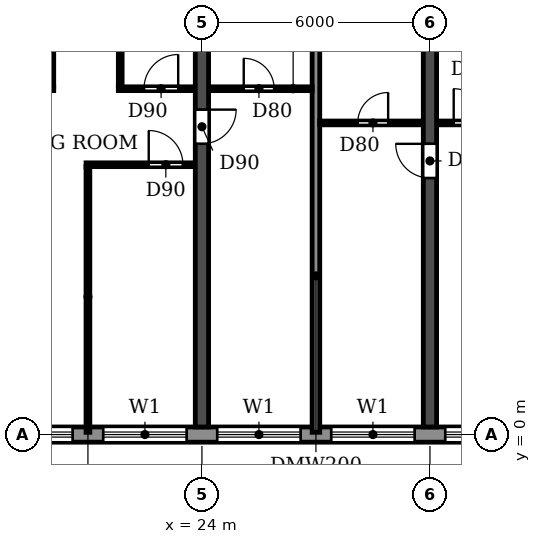
"""IFC4 building model, lengths in metres.
Left out: names, types, materials, properties, quantities, classifications, styles, units other than length and angle.
Written with IfcOpenShell. Run it as: python <this file> out.ifc"""

import sys

from ifc_helpers import new_model, si_unit, direction, frame, frame_2d, origin, place, context, subcontext, project, spatial, rectangle, extrude, element, fill, save


model = new_model("IFC4")
c1 = context("Model", 3, precision=1e-05, world=origin(), true_north=direction((0.0, 1.0)))
c2 = subcontext(c1, "Body", "Model", "MODEL_VIEW")
j1 = project(units=[si_unit("LENGTHUNIT", "METRE"), si_unit("PLANEANGLEUNIT", "RADIAN")], contexts=[c1])
p1 = place(None, origin())
s1 = spatial("IfcSite", under=j1, at=p1, CompositionType="ELEMENT")
p2 = place(p1, origin())
s2 = spatial("IfcBuilding", under=s1, at=p2, CompositionType="ELEMENT")
p3 = place(p2, frame((0.0, 0.0, 92.7)))
s3 = spatial("IfcBuildingStorey", under=s2, at=p3, CompositionType="ELEMENT", Elevation=92.7)
p4 = place(p3, frame((24.0, 0.2, 0.0), z_axis=(0.0, 0.0, 1.0), x_axis=(0.0, 1.0, 0.0)))
e1 = element("IfcWall", 1, at=p4, inside=s3, PredefinedType="SHEAR", context=c2, shape_type="SweptSolid", body=[
    extrude(rectangle(XDim=11.675, YDim=0.35, at=frame_2d((5.837, 0.0))), origin(), (0.0, 0.0, 1.0), 3.06),
])
p5 = place(p4, frame((7.45, 0.0, 0.0)))
e2 = element("IfcOpeningElement", 2, at=p5, cuts=e1, PredefinedType="OPENING", context=c2, shape_type="SweptSolid", body=[
    extrude(rectangle(XDim=0.9, YDim=2.1, at=frame_2d((0.45, 1.05))), frame((0.0, 0.185, 0.0), z_axis=(0.0, -1.0, 0.0), x_axis=(1.0, 0.0, 0.0)), (0.0, 0.0, 1.0), 0.37),
])
p6 = place(p3, frame((30.0, 0.2, 0.0), z_axis=(0.0, 0.0, 1.0), x_axis=(0.0, 1.0, 0.0)))
e3 = element("IfcWall", 3, at=p6, inside=s3, PredefinedType="SHEAR", context=c2, shape_type="SweptSolid", body=[
    extrude(rectangle(XDim=11.675, YDim=0.35, at=frame_2d((5.837, 0.0))), origin(), (0.0, 0.0, 1.0), 3.06),
])
p7 = place(p6, frame((6.55, 0.0, 0.0)))
e4 = element("IfcOpeningElement", 4, at=p7, cuts=e3, PredefinedType="OPENING", context=c2, shape_type="SweptSolid", body=[
    extrude(rectangle(XDim=0.9, YDim=2.1, at=frame_2d((0.45, 1.05))), frame((0.0, 0.185, 0.0), z_axis=(0.0, -1.0, 0.0), x_axis=(1.0, 0.0, 0.0)), (0.0, 0.0, 1.0), 0.37),
])
p8 = place(p3, frame((10.683, 0.0, 0.0), z_axis=(0.0, 0.0, 1.0), x_axis=(1.0, 0.0, 0.0)))
e5 = element("IfcWall", 5, at=p8, inside=s3, PredefinedType="STANDARD", context=c2, shape_type="SweptSolid", body=[
    extrude(rectangle(XDim=80.634, YDim=0.4, at=frame_2d((40.317, 0.0))), origin(), (0.0, 0.0, 1.0), 3.06),
])
p9 = place(p8, frame((1.717, 0.0, 0.9)))
e6 = element("IfcOpeningElement", 6, at=p9, cuts=e5, PredefinedType="OPENING", context=c2, shape_type="SweptSolid", body=[
    extrude(rectangle(XDim=2.2, YDim=1.5, at=frame_2d((1.1, 0.75))), frame((0.0, 0.21, 0.0), z_axis=(0.0, -1.0, 0.0), x_axis=(1.0, 0.0, 0.0)), (0.0, 0.0, 1.0), 0.42),
])
p10 = place(p8, frame((4.917, 0.0, 0.0)))
e7 = element("IfcOpeningElement", 7, at=p10, cuts=e5, PredefinedType="OPENING", context=c2, shape_type="SweptSolid", body=[
    extrude(rectangle(XDim=1.8, YDim=2.4, at=frame_2d((0.9, 1.2))), frame((0.0, 0.21, 0.0), z_axis=(0.0, -1.0, 0.0), x_axis=(1.0, 0.0, 0.0)), (0.0, 0.0, 1.0), 0.42),
])
p11 = place(p8, frame((7.717, 0.0, 0.9)))
e8 = element("IfcOpeningElement", 8, at=p11, cuts=e5, PredefinedType="OPENING", context=c2, shape_type="SweptSolid", body=[
    extrude(rectangle(XDim=2.2, YDim=1.5, at=frame_2d((1.1, 0.75))), frame((0.0, 0.21, 0.0), z_axis=(0.0, -1.0, 0.0), x_axis=(1.0, 0.0, 0.0)), (0.0, 0.0, 1.0), 0.42),
])
p12 = place(p8, frame((10.717, 0.0, 0.9)))
e9 = element("IfcOpeningElement", 9, at=p12, cuts=e5, PredefinedType="OPENING", context=c2, shape_type="SweptSolid", body=[
    extrude(rectangle(XDim=2.2, YDim=1.5, at=frame_2d((1.1, 0.75))), frame((0.0, 0.21, 0.0), z_axis=(0.0, -1.0, 0.0), x_axis=(1.0, 0.0, 0.0)), (0.0, 0.0, 1.0), 0.42),
])
p13 = place(p8, frame((13.717, 0.0, 0.9)))
e10 = element("IfcOpeningElement", 10, at=p13, cuts=e5, PredefinedType="OPENING", context=c2, shape_type="SweptSolid", body=[
    extrude(rectangle(XDim=2.2, YDim=1.5, at=frame_2d((1.1, 0.75))), frame((0.0, 0.21, 0.0), z_axis=(0.0, -1.0, 0.0), x_axis=(1.0, 0.0, 0.0)), (0.0, 0.0, 1.0), 0.42),
])
p14 = place(p8, frame((16.717, 0.0, 0.9)))
e11 = element("IfcOpeningElement", 11, at=p14, cuts=e5, PredefinedType="OPENING", context=c2, shape_type="SweptSolid", body=[
    extrude(rectangle(XDim=2.2, YDim=1.5, at=frame_2d((1.1, 0.75))), frame((0.0, 0.21, 0.0), z_axis=(0.0, -1.0, 0.0), x_axis=(1.0, 0.0, 0.0)), (0.0, 0.0, 1.0), 0.42),
])
p15 = place(p8, frame((19.717, 0.0, 0.9)))
e12 = element("IfcOpeningElement", 12, at=p15, cuts=e5, PredefinedType="OPENING", context=c2, shape_type="SweptSolid", body=[
    extrude(rectangle(XDim=2.2, YDim=1.5, at=frame_2d((1.1, 0.75))), frame((0.0, 0.21, 0.0), z_axis=(0.0, -1.0, 0.0), x_axis=(1.0, 0.0, 0.0)), (0.0, 0.0, 1.0), 0.42),
])
p16 = place(p8, frame((22.717, 0.0, 0.9)))
e13 = element("IfcOpeningElement", 13, at=p16, cuts=e5, PredefinedType="OPENING", context=c2, shape_type="SweptSolid", body=[
    extrude(rectangle(XDim=2.2, YDim=1.5, at=frame_2d((1.1, 0.75))), frame((0.0, 0.21, 0.0), z_axis=(0.0, -1.0, 0.0), x_axis=(1.0, 0.0, 0.0)), (0.0, 0.0, 1.0), 0.42),
])
p17 = place(p8, frame((25.717, 0.0, 0.9)))
e14 = element("IfcOpeningElement", 14, at=p17, cuts=e5, PredefinedType="OPENING", context=c2, shape_type="SweptSolid", body=[
    extrude(rectangle(XDim=2.2, YDim=1.5, at=frame_2d((1.1, 0.75))), frame((0.0, 0.21, 0.0), z_axis=(0.0, -1.0, 0.0), x_axis=(1.0, 0.0, 0.0)), (0.0, 0.0, 1.0), 0.42),
])
p18 = place(p8, frame((28.917, 0.0, 0.0)))
e15 = element("IfcOpeningElement", 15, at=p18, cuts=e5, PredefinedType="OPENING", context=c2, shape_type="SweptSolid", body=[
    extrude(rectangle(XDim=1.8, YDim=2.4, at=frame_2d((0.9, 1.2))), frame((0.0, 0.21, 0.0), z_axis=(0.0, -1.0, 0.0), x_axis=(1.0, 0.0, 0.0)), (0.0, 0.0, 1.0), 0.42),
])
p19 = place(p8, frame((31.717, 0.0, 0.9)))
e16 = element("IfcOpeningElement", 16, at=p19, cuts=e5, PredefinedType="OPENING", context=c2, shape_type="SweptSolid", body=[
    extrude(rectangle(XDim=2.2, YDim=1.5, at=frame_2d((1.1, 0.75))), frame((0.0, 0.21, 0.0), z_axis=(0.0, -1.0, 0.0), x_axis=(1.0, 0.0, 0.0)), (0.0, 0.0, 1.0), 0.42),
])
p20 = place(p8, frame((34.717, 0.0, 0.9)))
e17 = element("IfcOpeningElement", 17, at=p20, cuts=e5, PredefinedType="OPENING", context=c2, shape_type="SweptSolid", body=[
    extrude(rectangle(XDim=2.2, YDim=1.5, at=frame_2d((1.1, 0.75))), frame((0.0, 0.21, 0.0), z_axis=(0.0, -1.0, 0.0), x_axis=(1.0, 0.0, 0.0)), (0.0, 0.0, 1.0), 0.42),
])
p21 = place(p8, frame((37.917, 0.0, 0.0)))
e18 = element("IfcOpeningElement", 18, at=p21, cuts=e5, PredefinedType="OPENING", context=c2, shape_type="SweptSolid", body=[
    extrude(rectangle(XDim=1.8, YDim=2.4, at=frame_2d((0.9, 1.2))), frame((0.0, 0.21, 0.0), z_axis=(0.0, -1.0, 0.0), x_axis=(1.0, 0.0, 0.0)), (0.0, 0.0, 1.0), 0.42),
])
p22 = place(p8, frame((40.717, 0.0, 0.9)))
e19 = element("IfcOpeningElement", 19, at=p22, cuts=e5, PredefinedType="OPENING", context=c2, shape_type="SweptSolid", body=[
    extrude(rectangle(XDim=2.2, YDim=1.5, at=frame_2d((1.1, 0.75))), frame((0.0, 0.21, 0.0), z_axis=(0.0, -1.0, 0.0), x_axis=(1.0, 0.0, 0.0)), (0.0, 0.0, 1.0), 0.42),
])
p23 = place(p8, frame((43.717, 0.0, 0.9)))
e20 = element("IfcOpeningElement", 20, at=p23, cuts=e5, PredefinedType="OPENING", context=c2, shape_type="SweptSolid", body=[
    extrude(rectangle(XDim=2.2, YDim=1.5, at=frame_2d((1.1, 0.75))), frame((0.0, 0.21, 0.0), z_axis=(0.0, -1.0, 0.0), x_axis=(1.0, 0.0, 0.0)), (0.0, 0.0, 1.0), 0.42),
])
p24 = place(p8, frame((46.717, 0.0, 0.9)))
e21 = element("IfcOpeningElement", 21, at=p24, cuts=e5, PredefinedType="OPENING", context=c2, shape_type="SweptSolid", body=[
    extrude(rectangle(XDim=2.2, YDim=1.5, at=frame_2d((1.1, 0.75))), frame((0.0, 0.21, 0.0), z_axis=(0.0, -1.0, 0.0), x_axis=(1.0, 0.0, 0.0)), (0.0, 0.0, 1.0), 0.42),
])
p25 = place(p8, frame((49.717, 0.0, 0.9)))
e22 = element("IfcOpeningElement", 22, at=p25, cuts=e5, PredefinedType="OPENING", context=c2, shape_type="SweptSolid", body=[
    extrude(rectangle(XDim=2.2, YDim=1.5, at=frame_2d((1.1, 0.75))), frame((0.0, 0.21, 0.0), z_axis=(0.0, -1.0, 0.0), x_axis=(1.0, 0.0, 0.0)), (0.0, 0.0, 1.0), 0.42),
])
p26 = place(p8, frame((52.917, 0.0, 0.0)))
e23 = element("IfcOpeningElement", 23, at=p26, cuts=e5, PredefinedType="OPENING", context=c2, shape_type="SweptSolid", body=[
    extrude(rectangle(XDim=1.8, YDim=2.4, at=frame_2d((0.9, 1.2))), frame((0.0, 0.21, 0.0), z_axis=(0.0, -1.0, 0.0), x_axis=(1.0, 0.0, 0.0)), (0.0, 0.0, 1.0), 0.42),
])
p27 = place(p8, frame((55.717, 0.0, 0.9)))
e24 = element("IfcOpeningElement", 24, at=p27, cuts=e5, PredefinedType="OPENING", context=c2, shape_type="SweptSolid", body=[
    extrude(rectangle(XDim=2.2, YDim=1.5, at=frame_2d((1.1, 0.75))), frame((0.0, 0.21, 0.0), z_axis=(0.0, -1.0, 0.0), x_axis=(1.0, 0.0, 0.0)), (0.0, 0.0, 1.0), 0.42),
])
p28 = place(p8, frame((58.717, 0.0, 0.9)))
e25 = element("IfcOpeningElement", 25, at=p28, cuts=e5, PredefinedType="OPENING", context=c2, shape_type="SweptSolid", body=[
    extrude(rectangle(XDim=2.2, YDim=1.5, at=frame_2d((1.1, 0.75))), frame((0.0, 0.21, 0.0), z_axis=(0.0, -1.0, 0.0), x_axis=(1.0, 0.0, 0.0)), (0.0, 0.0, 1.0), 0.42),
])
p29 = place(p8, frame((61.717, 0.0, 0.9)))
e26 = element("IfcOpeningElement", 26, at=p29, cuts=e5, PredefinedType="OPENING", context=c2, shape_type="SweptSolid", body=[
    extrude(rectangle(XDim=2.2, YDim=1.5, at=frame_2d((1.1, 0.75))), frame((0.0, 0.21, 0.0), z_axis=(0.0, -1.0, 0.0), x_axis=(1.0, 0.0, 0.0)), (0.0, 0.0, 1.0), 0.42),
])
p30 = place(p8, frame((64.917, 0.0, 0.0)))
e27 = element("IfcOpeningElement", 27, at=p30, cuts=e5, PredefinedType="OPENING", context=c2, shape_type="SweptSolid", body=[
    extrude(rectangle(XDim=1.8, YDim=2.4, at=frame_2d((0.9, 1.2))), frame((0.0, 0.21, 0.0), z_axis=(0.0, -1.0, 0.0), x_axis=(1.0, 0.0, 0.0)), (0.0, 0.0, 1.0), 0.42),
])
p31 = place(p8, frame((67.717, 0.0, 0.9)))
e28 = element("IfcOpeningElement", 28, at=p31, cuts=e5, PredefinedType="OPENING", context=c2, shape_type="SweptSolid", body=[
    extrude(rectangle(XDim=2.2, YDim=1.5, at=frame_2d((1.1, 0.75))), frame((0.0, 0.21, 0.0), z_axis=(0.0, -1.0, 0.0), x_axis=(1.0, 0.0, 0.0)), (0.0, 0.0, 1.0), 0.42),
])
p32 = place(p8, frame((70.717, 0.0, 0.9)))
e29 = element("IfcOpeningElement", 29, at=p32, cuts=e5, PredefinedType="OPENING", context=c2, shape_type="SweptSolid", body=[
    extrude(rectangle(XDim=2.2, YDim=1.5, at=frame_2d((1.1, 0.75))), frame((0.0, 0.21, 0.0), z_axis=(0.0, -1.0, 0.0), x_axis=(1.0, 0.0, 0.0)), (0.0, 0.0, 1.0), 0.42),
])
p33 = place(p8, frame((73.917, 0.0, 0.0)))
e30 = element("IfcOpeningElement", 30, at=p33, cuts=e5, PredefinedType="OPENING", context=c2, shape_type="SweptSolid", body=[
    extrude(rectangle(XDim=1.8, YDim=2.4, at=frame_2d((0.9, 1.2))), frame((0.0, 0.21, 0.0), z_axis=(0.0, -1.0, 0.0), x_axis=(1.0, 0.0, 0.0)), (0.0, 0.0, 1.0), 0.42),
])
p34 = place(p8, frame((76.717, 0.0, 0.9)))
e31 = element("IfcOpeningElement", 31, at=p34, cuts=e5, PredefinedType="OPENING", context=c2, shape_type="SweptSolid", body=[
    extrude(rectangle(XDim=2.2, YDim=1.5, at=frame_2d((1.1, 0.75))), frame((0.0, 0.21, 0.0), z_axis=(0.0, -1.0, 0.0), x_axis=(1.0, 0.0, 0.0)), (0.0, 0.0, 1.0), 0.42),
])
p35 = place(p3, frame((27.0, 0.06, 0.0), z_axis=(0.0, 0.0, 1.0), x_axis=(0.0, 1.0, 0.0)))
e32 = element("IfcWall", 32, at=p35, inside=s3, PredefinedType="PARTITIONING", context=c2, shape_type="SweptSolid", body=[
    extrude(rectangle(XDim=11.805, YDim=0.2, at=frame_2d((5.902, 0.0))), origin(), (0.0, 0.0, 1.0), 3.06),
])
p36 = place(p3, frame((20.95, 7.1, 0.0), z_axis=(0.0, 0.0, 1.0), x_axis=(1.0, 0.0, 0.0)))
e33 = element("IfcWall", 33, at=p36, inside=s3, PredefinedType="PARTITIONING", context=c2, shape_type="SweptSolid", body=[
    extrude(rectangle(XDim=2.865, YDim=0.1, at=frame_2d((1.433, 0.0))), origin(), (0.0, 0.0, 1.0), 3.06),
])
p37 = place(p36, frame((1.65, 0.0, 0.0)))
e34 = element("IfcOpeningElement", 34, at=p37, cuts=e33, PredefinedType="OPENING", context=c2, shape_type="SweptSolid", body=[
    extrude(rectangle(XDim=0.9, YDim=2.1, at=frame_2d((0.45, 1.05))), frame((0.0, 0.06, 0.0), z_axis=(0.0, -1.0, 0.0), x_axis=(1.0, 0.0, 0.0)), (0.0, 0.0, 1.0), 0.12),
])
p38 = place(p3, frame((27.1, 8.2, 0.0), z_axis=(0.0, 0.0, 1.0), x_axis=(1.0, 0.0, 0.0)))
e35 = element("IfcWall", 35, at=p38, inside=s3, PredefinedType="PARTITIONING", context=c2, shape_type="SweptSolid", body=[
    extrude(rectangle(XDim=2.715, YDim=0.1, at=frame_2d((1.357, 0.0))), origin(), (0.0, 0.0, 1.0), 3.06),
])
p39 = place(p38, frame((1.0, 0.0, 0.0)))
e36 = element("IfcOpeningElement", 36, at=p39, cuts=e35, PredefinedType="OPENING", context=c2, shape_type="SweptSolid", body=[
    extrude(rectangle(XDim=0.8, YDim=2.1, at=frame_2d((0.4, 1.05))), frame((0.0, 0.06, 0.0), z_axis=(0.0, -1.0, 0.0), x_axis=(1.0, 0.0, 0.0)), (0.0, 0.0, 1.0), 0.12),
])
p40 = place(p3, frame((30.185, 8.2, 0.0), z_axis=(0.0, 0.0, 1.0), x_axis=(1.0, 0.0, 0.0)))
e37 = element("IfcWall", 37, at=p40, inside=s3, PredefinedType="PARTITIONING", context=c2, shape_type="SweptSolid", body=[
    extrude(rectangle(XDim=2.015, YDim=0.1, at=frame_2d((1.007, 0.0))), origin(), (0.0, 0.0, 1.0), 3.06),
])
p41 = place(p40, frame((0.44, 0.0, 0.0)))
e38 = element("IfcOpeningElement", 38, at=p41, cuts=e37, PredefinedType="OPENING", context=c2, shape_type="SweptSolid", body=[
    extrude(rectangle(XDim=0.9, YDim=2.1, at=frame_2d((0.45, 1.05))), frame((0.0, 0.06, 0.0), z_axis=(0.0, -1.0, 0.0), x_axis=(1.0, 0.0, 0.0)), (0.0, 0.0, 1.0), 0.12),
])
p42 = place(p3, frame((18.185, 9.1, 0.0), z_axis=(0.0, 0.0, 1.0), x_axis=(1.0, 0.0, 0.0)))
e39 = element("IfcWall", 39, at=p42, inside=s3, PredefinedType="PARTITIONING", context=c2, shape_type="SweptSolid", body=[
    extrude(rectangle(XDim=1.915, YDim=0.1, at=frame_2d((0.958, 0.0))), origin(), (0.0, 0.0, 1.0), 3.06),
])
p43 = place(p42, frame((0.44, 0.0, 0.0)))
e40 = element("IfcOpeningElement", 40, at=p43, cuts=e39, PredefinedType="OPENING", context=c2, shape_type="SweptSolid", body=[
    extrude(rectangle(XDim=0.8, YDim=2.1, at=frame_2d((0.4, 1.05))), frame((0.0, 0.06, 0.0), z_axis=(0.0, -1.0, 0.0), x_axis=(1.0, 0.0, 0.0)), (0.0, 0.0, 1.0), 0.12),
])
p44 = place(p3, frame((21.8, 9.1, 0.0), z_axis=(0.0, 0.0, 1.0), x_axis=(1.0, 0.0, 0.0)))
e41 = element("IfcWall", 41, at=p44, inside=s3, PredefinedType="PARTITIONING", context=c2, shape_type="SweptSolid", body=[
    extrude(rectangle(XDim=2.015, YDim=0.1, at=frame_2d((1.007, 0.0))), origin(), (0.0, 0.0, 1.0), 3.06),
])
p45 = place(p44, frame((0.675, 0.0, 0.0)))
e42 = element("IfcOpeningElement", 42, at=p45, cuts=e41, PredefinedType="OPENING", context=c2, shape_type="SweptSolid", body=[
    extrude(rectangle(XDim=0.9, YDim=2.1, at=frame_2d((0.45, 1.05))), frame((0.0, 0.06, 0.0), z_axis=(0.0, -1.0, 0.0), x_axis=(1.0, 0.0, 0.0)), (0.0, 0.0, 1.0), 0.12),
])
p46 = place(p3, frame((24.185, 9.1, 0.0), z_axis=(0.0, 0.0, 1.0), x_axis=(1.0, 0.0, 0.0)))
e43 = element("IfcWall", 43, at=p46, inside=s3, PredefinedType="PARTITIONING", context=c2, shape_type="SweptSolid", body=[
    extrude(rectangle(XDim=2.715, YDim=0.1, at=frame_2d((1.357, 0.0))), origin(), (0.0, 0.0, 1.0), 3.06),
])
p47 = place(p46, frame((0.915, 0.0, 0.0)))
e44 = element("IfcOpeningElement", 44, at=p47, cuts=e43, PredefinedType="OPENING", context=c2, shape_type="SweptSolid", body=[
    extrude(rectangle(XDim=0.8, YDim=2.1, at=frame_2d((0.4, 1.05))), frame((0.0, 0.06, 0.0), z_axis=(0.0, -1.0, 0.0), x_axis=(1.0, 0.0, 0.0)), (0.0, 0.0, 1.0), 0.12),
])
p48 = place(p3, frame((20.05, 9.15, 0.0), z_axis=(0.0, 0.0, 1.0), x_axis=(0.0, 1.0, 0.0)))
e45 = element("IfcWall", 45, at=p48, inside=s3, PredefinedType="PARTITIONING", context=c2, shape_type="SweptSolid", body=[
    extrude(rectangle(XDim=2.715, YDim=0.1, at=frame_2d((1.357, 0.0))), origin(), (0.0, 0.0, 1.0), 3.06),
])
p49 = place(p3, frame((21.0, 0.06, 0.0), z_axis=(0.0, 0.0, 1.0), x_axis=(0.0, 1.0, 0.0)))
e46 = element("IfcWall", 46, at=p49, inside=s3, PredefinedType="PARTITIONING", context=c2, shape_type="SweptSolid", body=[
    extrude(rectangle(XDim=6.99, YDim=0.1, at=frame_2d((3.495, 0.0))), origin(), (0.0, 0.0, 1.0), 3.06),
])
p50 = place(p3, frame((21.85, 9.15, 0.0), z_axis=(0.0, 0.0, 1.0), x_axis=(0.0, 1.0, 0.0)))
e47 = element("IfcWall", 47, at=p50, inside=s3, PredefinedType="PARTITIONING", context=c2, shape_type="SweptSolid", body=[
    extrude(rectangle(XDim=2.715, YDim=0.1, at=frame_2d((1.357, 0.0))), origin(), (0.0, 0.0, 1.0), 3.06),
])
p51 = place(p11, origin())
e48 = element("IfcWindow", 48, at=p51, inside=s3, PartitioningType="DOUBLE_PANEL_HORIZONTAL", PredefinedType="WINDOW", context=c2, shape_type="SweptSolid", body=[
    extrude(rectangle(XDim=2.2, YDim=1.5, at=frame_2d((1.1, 0.75))), frame((0.0, 0.03, 0.0), z_axis=(0.0, -1.0, 0.0), x_axis=(1.0, 0.0, 0.0)), (0.0, 0.0, 1.0), 0.06),
])
fill(e8, e48)
p52 = place(p12, origin())
e49 = element("IfcWindow", 49, at=p52, inside=s3, PartitioningType="DOUBLE_PANEL_HORIZONTAL", PredefinedType="WINDOW", context=c2, shape_type="SweptSolid", body=[
    extrude(rectangle(XDim=2.2, YDim=1.5, at=frame_2d((1.1, 0.75))), frame((0.0, 0.03, 0.0), z_axis=(0.0, -1.0, 0.0), x_axis=(1.0, 0.0, 0.0)), (0.0, 0.0, 1.0), 0.06),
])
fill(e9, e49)
p53 = place(p13, origin())
e50 = element("IfcWindow", 50, at=p53, inside=s3, PartitioningType="DOUBLE_PANEL_HORIZONTAL", PredefinedType="WINDOW", context=c2, shape_type="SweptSolid", body=[
    extrude(rectangle(XDim=2.2, YDim=1.5, at=frame_2d((1.1, 0.75))), frame((0.0, 0.03, 0.0), z_axis=(0.0, -1.0, 0.0), x_axis=(1.0, 0.0, 0.0)), (0.0, 0.0, 1.0), 0.06),
])
fill(e10, e50)
p54 = place(p14, origin())
e51 = element("IfcWindow", 51, at=p54, inside=s3, PartitioningType="DOUBLE_PANEL_HORIZONTAL", PredefinedType="WINDOW", context=c2, shape_type="SweptSolid", body=[
    extrude(rectangle(XDim=2.2, YDim=1.5, at=frame_2d((1.1, 0.75))), frame((0.0, 0.03, 0.0), z_axis=(0.0, -1.0, 0.0), x_axis=(1.0, 0.0, 0.0)), (0.0, 0.0, 1.0), 0.06),
])
fill(e11, e51)
p55 = place(p15, origin())
e52 = element("IfcWindow", 52, at=p55, inside=s3, PartitioningType="DOUBLE_PANEL_HORIZONTAL", PredefinedType="WINDOW", context=c2, shape_type="SweptSolid", body=[
    extrude(rectangle(XDim=2.2, YDim=1.5, at=frame_2d((1.1, 0.75))), frame((0.0, 0.03, 0.0), z_axis=(0.0, -1.0, 0.0), x_axis=(1.0, 0.0, 0.0)), (0.0, 0.0, 1.0), 0.06),
])
fill(e12, e52)
p56 = place(p47, origin())
e53 = element("IfcDoor", 53, at=p56, inside=s3, OperationType="SINGLE_SWING_LEFT", PredefinedType="DOOR", context=c2, shape_type="SweptSolid", body=[
    extrude(rectangle(XDim=0.8, YDim=2.1, at=frame_2d((0.4, 1.05))), frame((0.0, 0.025, 0.0), z_axis=(0.0, -1.0, 0.0), x_axis=(1.0, 0.0, 0.0)), (0.0, 0.0, 1.0), 0.05),
])
fill(e44, e53)
p57 = place(p45, origin())
e54 = element("IfcDoor", 54, at=p57, inside=s3, OperationType="SINGLE_SWING_RIGHT", PredefinedType="DOOR", context=c2, shape_type="SweptSolid", body=[
    extrude(rectangle(XDim=0.9, YDim=2.1, at=frame_2d((0.45, 1.05))), frame((0.0, 0.025, 0.0), z_axis=(0.0, -1.0, 0.0), x_axis=(1.0, 0.0, 0.0)), (0.0, 0.0, 1.0), 0.05),
])
fill(e42, e54)
p58 = place(p37, origin())
e55 = element("IfcDoor", 55, at=p58, inside=s3, OperationType="SINGLE_SWING_LEFT", PredefinedType="DOOR", context=c2, shape_type="SweptSolid", body=[
    extrude(rectangle(XDim=0.9, YDim=2.1, at=frame_2d((0.45, 1.05))), frame((0.0, 0.025, 0.0), z_axis=(0.0, -1.0, 0.0), x_axis=(1.0, 0.0, 0.0)), (0.0, 0.0, 1.0), 0.05),
])
fill(e34, e55)
p59 = place(p5, frame((0.9, 0.0, 0.0), z_axis=(0.0, 0.0, 1.0), x_axis=(-1.0, 0.0, 0.0)))
e56 = element("IfcDoor", 56, at=p59, inside=s3, OperationType="SINGLE_SWING_LEFT", PredefinedType="DOOR", context=c2, shape_type="SweptSolid", body=[
    extrude(rectangle(XDim=0.9, YDim=2.1, at=frame_2d((0.45, 1.05))), frame((0.0, 0.025, 0.0), z_axis=(0.0, -1.0, 0.0), x_axis=(1.0, 0.0, 0.0)), (0.0, 0.0, 1.0), 0.05),
])
fill(e2, e56)
p60 = place(p39, origin())
e57 = element("IfcDoor", 57, at=p60, inside=s3, OperationType="SINGLE_SWING_RIGHT", PredefinedType="DOOR", context=c2, shape_type="SweptSolid", body=[
    extrude(rectangle(XDim=0.8, YDim=2.1, at=frame_2d((0.4, 1.05))), frame((0.0, 0.025, 0.0), z_axis=(0.0, -1.0, 0.0), x_axis=(1.0, 0.0, 0.0)), (0.0, 0.0, 1.0), 0.05),
])
fill(e36, e57)
p61 = place(p7, origin())
e58 = element("IfcDoor", 58, at=p61, inside=s3, OperationType="SINGLE_SWING_RIGHT", PredefinedType="DOOR", context=c2, shape_type="SweptSolid", body=[
    extrude(rectangle(XDim=0.9, YDim=2.1, at=frame_2d((0.45, 1.05))), frame((0.0, 0.025, 0.0), z_axis=(0.0, -1.0, 0.0), x_axis=(1.0, 0.0, 0.0)), (0.0, 0.0, 1.0), 0.05),
])
fill(e4, e58)
p62 = place(p41, origin())
e59 = element("IfcDoor", 59, at=p62, inside=s3, OperationType="SINGLE_SWING_LEFT", PredefinedType="DOOR", context=c2, shape_type="SweptSolid", body=[
    extrude(rectangle(XDim=0.9, YDim=2.1, at=frame_2d((0.45, 1.05))), frame((0.0, 0.025, 0.0), z_axis=(0.0, -1.0, 0.0), x_axis=(1.0, 0.0, 0.0)), (0.0, 0.0, 1.0), 0.05),
])
fill(e38, e59)
save(model, sys.argv[1])
